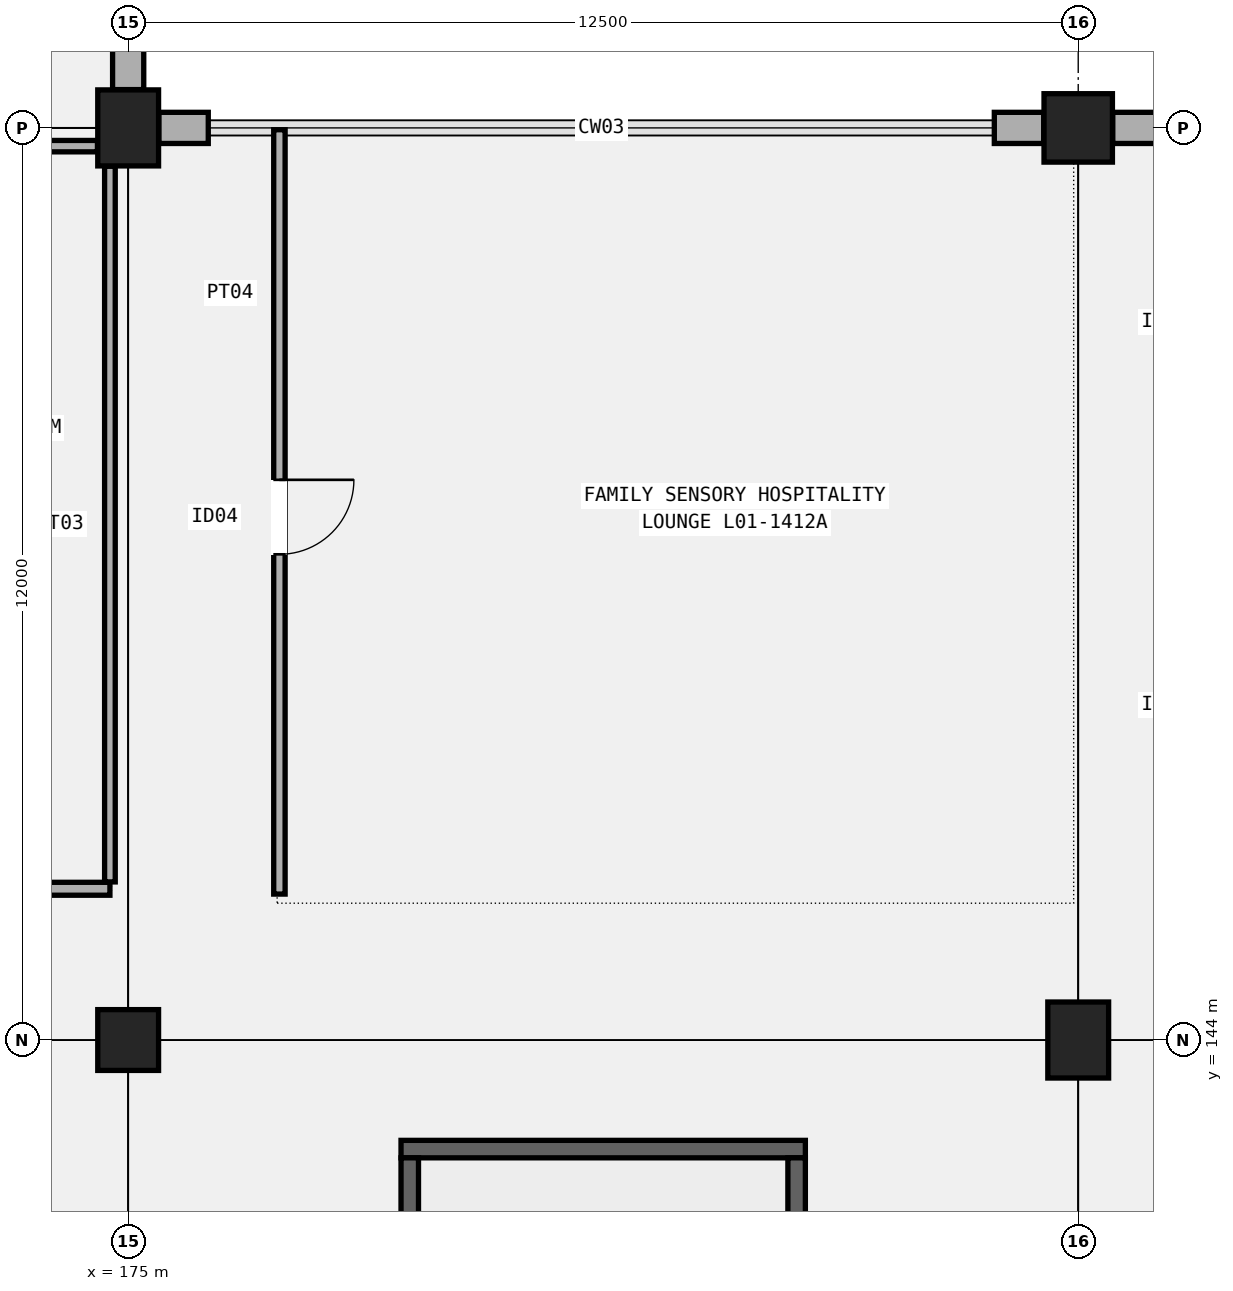
"""IFC4 building model, lengths in metres.
Left out: names, types, materials, properties, quantities, classifications, styles, units other than length and angle.
Written with IfcOpenShell. Run it as: python <this file> out.ifc"""

import sys

from ifc_helpers import new_model, si_unit, direction, frame, frame_2d, origin, origin_2d, place, context, subcontext, project, spatial, rectangle, extrude, element, fill, save


model = new_model("IFC4")
c1 = context("Model", 3, precision=1e-05, world=origin(), true_north=direction((0.0, 1.0)))
c2 = subcontext(c1, "Body", "Model", "MODEL_VIEW")
j1 = project(units=[si_unit("LENGTHUNIT", "METRE"), si_unit("PLANEANGLEUNIT", "RADIAN")], contexts=[c1])
p1 = place(None, origin())
s1 = spatial("IfcSite", under=j1, at=p1, CompositionType="ELEMENT")
p2 = place(p1, origin())
s2 = spatial("IfcBuilding", under=s1, at=p2, CompositionType="ELEMENT")
p3 = place(p2, frame((0.0, 0.0, 5.4)))
s3 = spatial("IfcBuildingStorey", under=s2, at=p3, CompositionType="ELEMENT", Elevation=5.4)
p4 = place(p3, frame((175.0, 144.0, 0.0), z_axis=(0.0, 0.0, 1.0), x_axis=(1.0, 0.0, 0.0)))
e1 = element("IfcColumn", 1, at=p4, inside=s3, PredefinedType="COLUMN", context=c2, shape_type="SweptSolid", body=[
    extrude(rectangle(XDim=0.8, YDim=0.8, at=origin_2d()), origin(), (0.0, 0.0, 1.0), 4.8),
])
for number, where, z_axis, x_axis in (
    (2, (175.0, 156.0, 0.0), (0.0, 0.0, 1.0), (1.0, 0.0, 0.0)),
    (3, (187.5, 144.0, 0.0), (0.0, 0.0, 1.0), (1.0, 0.0, 0.0)),
):
    element("IfcColumn", number, at=place(p3, frame(where, z_axis=z_axis, x_axis=x_axis)), inside=s3, PredefinedType="COLUMN", context=c2, shape_type="SweptSolid", body=[
        extrude(rectangle(XDim=0.8, YDim=1.0, at=origin_2d()), origin(), (0.0, 0.0, 1.0), 4.8),
    ])
p5 = place(p3, frame((187.5, 156.0, 0.0), z_axis=(0.0, 0.0, 1.0), x_axis=(1.0, 0.0, 0.0)))
e4 = element("IfcColumn", 4, at=p5, inside=s3, PredefinedType="COLUMN", context=c2, shape_type="SweptSolid", body=[
    extrude(rectangle(XDim=0.9, YDim=0.9, at=origin_2d()), origin(), (0.0, 0.0, 1.0), 4.8),
])
p6 = place(p3, frame((175.0, 156.504, 0.0), z_axis=(0.0, 0.0, 1.0), x_axis=(0.0, 1.0, 0.0)))
e5 = element("IfcWall", 5, at=p6, inside=s3, PredefinedType="SOLIDWALL", context=c2, shape_type="SweptSolid", body=[
    extrude(rectangle(XDim=0.65, YDim=0.41, at=frame_2d((0.325, 0.0))), origin(), (0.0, 0.0, 1.0), 4.2),
])
for number, where, z_axis, x_axis in (
    (6, (175.404, 156.0, 0.0), (0.0, 0.0, 1.0), (1.0, 0.0, 0.0)),
    (7, (186.396, 156.0, 0.0), (0.0, 0.0, 1.0), (1.0, 0.0, 0.0)),
):
    element("IfcWall", number, at=place(p3, frame(where, z_axis=z_axis, x_axis=x_axis)), inside=s3, PredefinedType="SOLIDWALL", context=c2, shape_type="SweptSolid", body=[
        extrude(rectangle(XDim=0.65, YDim=0.41, at=frame_2d((0.325, 0.0))), origin(), (0.0, 0.0, 1.0), 4.2),
    ])
p7 = place(p3, frame((187.954, 156.0, 0.0), z_axis=(0.0, 0.0, 1.0), x_axis=(1.0, 0.0, 0.0)))
e8 = element("IfcWall", 8, at=p7, inside=s3, PredefinedType="SOLIDWALL", context=c2, shape_type="SweptSolid", body=[
    extrude(rectangle(XDim=11.642, YDim=0.41, at=frame_2d((5.821, 0.0))), origin(), (0.0, 0.0, 1.0), 4.15),
])
p8 = place(p7, frame((2.166, 0.0, 0.95)))
e9 = element("IfcOpeningElement", 9, at=p8, cuts=e8, PredefinedType="OPENING", context=c2, shape_type="SweptSolid", body=[
    extrude(rectangle(XDim=2.55, YDim=1.95, at=frame_2d((1.275, 0.975))), frame((0.0, 0.215, 0.0), z_axis=(0.0, -1.0, 0.0), x_axis=(1.0, 0.0, 0.0)), (0.0, 0.0, 1.0), 0.43),
])
p9 = place(p3, frame((178.59, 142.565, 0.0), z_axis=(0.0, 0.0, 1.0), x_axis=(1.0, 0.0, 0.0)))
e10 = element("IfcWall", 10, at=p9, inside=s3, PredefinedType="SHEAR", context=c2, shape_type="SweptSolid", body=[
    extrude(rectangle(XDim=5.32, YDim=0.23, at=frame_2d((2.66, 0.0))), origin(), (0.0, 0.0, 1.0), 4.55),
])
for number, where, z_axis, x_axis in (
    (11, (178.705, 133.55, 0.0), (0.0, 0.0, 1.0), (0.0, 1.0, 0.0)),
    (12, (183.795, 133.55, 0.0), (0.0, 0.0, 1.0), (0.0, 1.0, 0.0)),
):
    element("IfcWall", number, at=place(p3, frame(where, z_axis=z_axis, x_axis=x_axis)), inside=s3, PredefinedType="SHEAR", context=c2, shape_type="SweptSolid", body=[
        extrude(rectangle(XDim=8.9, YDim=0.23, at=frame_2d((4.45, 0.0))), origin(), (0.0, 0.0, 1.0), 4.55),
    ])
p10 = place(p3, frame((162.74, 145.99, 0.0), z_axis=(0.0, 0.0, 1.0), x_axis=(1.0, 0.0, 0.0)))
e13 = element("IfcWall", 13, at=p10, inside=s3, PredefinedType="PARTITIONING", context=c2, shape_type="SweptSolid", body=[
    extrude(rectangle(XDim=12.02, YDim=0.17, at=frame_2d((6.01, 0.0))), origin(), (0.0, 0.0, 1.0), 3.92),
])
p11 = place(p10, frame((0.782, 0.0, 0.0)))
e14 = element("IfcOpeningElement", 14, at=p11, cuts=e13, PredefinedType="OPENING", context=c2, shape_type="SweptSolid", body=[
    extrude(rectangle(XDim=1.44, YDim=2.26, at=frame_2d((0.72, 1.13))), frame((0.0, 0.095, 0.0), z_axis=(0.0, -1.0, 0.0), x_axis=(1.0, 0.0, 0.0)), (0.0, 0.0, 1.0), 0.19),
])
p12 = place(p10, frame((4.518, 0.0, 0.0)))
e15 = element("IfcOpeningElement", 15, at=p12, cuts=e13, PredefinedType="OPENING", context=c2, shape_type="SweptSolid", body=[
    extrude(rectangle(XDim=1.48, YDim=2.24, at=frame_2d((0.74, 1.12))), frame((0.0, 0.095, 0.0), z_axis=(0.0, -1.0, 0.0), x_axis=(1.0, 0.0, 0.0)), (0.0, 0.0, 1.0), 0.19),
])
p13 = place(p10, frame((9.006, 0.0, 0.0)))
e16 = element("IfcOpeningElement", 16, at=p13, cuts=e13, PredefinedType="OPENING", context=c2, shape_type="SweptSolid", body=[
    extrude(rectangle(XDim=1.52, YDim=2.28, at=frame_2d((0.76, 1.14))), frame((0.0, 0.095, 0.0), z_axis=(0.0, -1.0, 0.0), x_axis=(1.0, 0.0, 0.0)), (0.0, 0.0, 1.0), 0.19),
])
p14 = place(p3, frame((174.76, 146.08, 0.0), z_axis=(0.0, 0.0, 1.0), x_axis=(0.0, 1.0, 0.0)))
e17 = element("IfcWall", 17, at=p14, inside=s3, PredefinedType="PARTITIONING", context=c2, shape_type="SweptSolid", body=[
    extrude(rectangle(XDim=9.416, YDim=0.14, at=frame_2d((4.708, 0.0))), origin(), (0.0, 0.0, 1.0), 3.92),
])
p15 = place(p3, frame((162.904, 155.76, 0.0), z_axis=(0.0, 0.0, 1.0), x_axis=(1.0, 0.0, 0.0)))
e18 = element("IfcWall", 18, at=p15, inside=s3, PredefinedType="PARTITIONING", context=c2, shape_type="SweptSolid", body=[
    extrude(rectangle(XDim=11.692, YDim=0.15, at=frame_2d((5.846, 0.0))), origin(), (0.0, 0.0, 1.0), 3.92),
])
p16 = place(p3, frame((176.99, 145.92, 0.0), z_axis=(0.0, 0.0, 1.0), x_axis=(0.0, 1.0, 0.0)))
e19 = element("IfcWall", 19, at=p16, inside=s3, PredefinedType="PARTITIONING", context=c2, shape_type="SweptSolid", body=[
    extrude(rectangle(XDim=10.056, YDim=0.15, at=frame_2d((5.028, 0.0))), origin(), (0.0, 0.0, 1.0), 3.92),
])
p17 = place(p16, frame((5.45, 0.0, 0.0), z_axis=(0.0, 0.0, 1.0), x_axis=(-1.0, 0.0, 0.0)))
e20 = element("IfcOpeningElement", 20, at=p17, cuts=e19, PredefinedType="OPENING", context=c2, shape_type="SweptSolid", body=[
    extrude(rectangle(XDim=0.98, YDim=2.1, at=frame_2d((0.49, 1.05))), frame((0.0, 0.085, 0.0), z_axis=(0.0, -1.0, 0.0), x_axis=(1.0, 0.0, 0.0)), (0.0, 0.0, 1.0), 0.17),
])
p18 = place(p17, origin())
e21 = element("IfcDoor", 21, at=p18, inside=s3, OperationType="SINGLE_SWING_LEFT", PredefinedType="DOOR", context=c2, shape_type="SweptSolid", body=[
    extrude(rectangle(XDim=0.98, YDim=2.1, at=frame_2d((0.49, 1.05))), frame((0.0, 0.025, 0.0), z_axis=(0.0, -1.0, 0.0), x_axis=(1.0, 0.0, 0.0)), (0.0, 0.0, 1.0), 0.05),
])
fill(e20, e21)
save(model, sys.argv[1])
